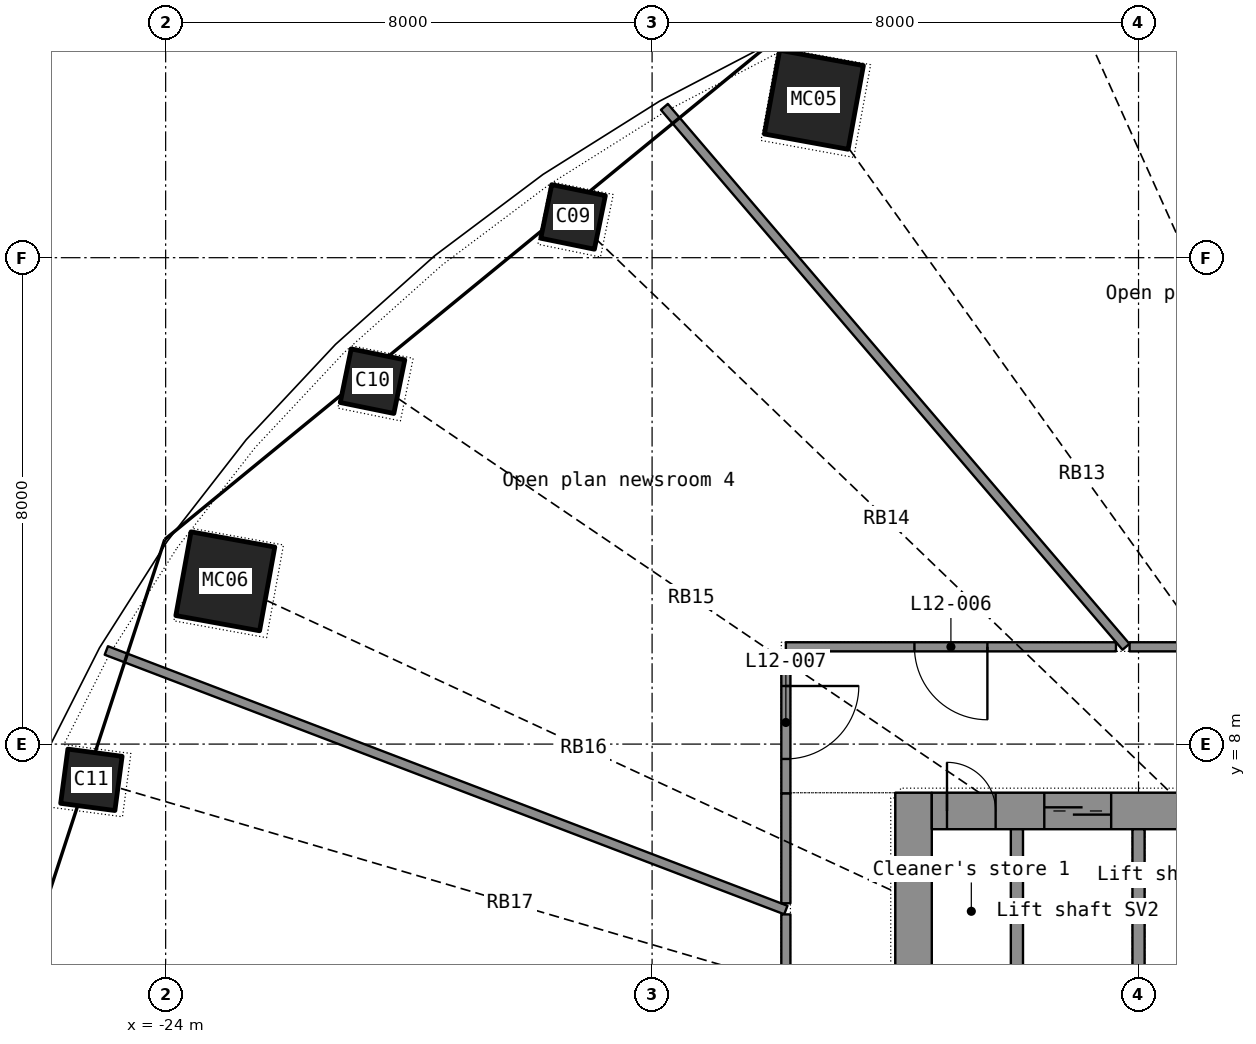
"""IFC4 building model, lengths in metres.
Left out: names, types, materials, properties, quantities, classifications, styles, units other than length and angle.
Written with IfcOpenShell. Run it as: python <this file> out.ifc"""

import sys

from ifc_helpers import new_model, si_unit, direction, frame, frame_2d, origin, origin_2d, place, context, subcontext, project, spatial, rectangle, hollow_rectangle, extrude, element, fill, save


model = new_model("IFC4")
c1 = context("Model", 3, precision=1e-05, world=origin(), true_north=direction((0.0, 1.0)))
c2 = subcontext(c1, "Body", "Model", "MODEL_VIEW")
j1 = project(units=[si_unit("LENGTHUNIT", "METRE"), si_unit("PLANEANGLEUNIT", "RADIAN")], contexts=[c1])
p1 = place(None, origin())
s1 = spatial("IfcSite", under=j1, at=p1, CompositionType="ELEMENT")
p2 = place(p1, origin())
s2 = spatial("IfcBuilding", under=s1, at=p2, CompositionType="ELEMENT")
p3 = place(p2, frame((0.0, 0.0, 55.6)))
s3 = spatial("IfcBuildingStorey", under=s2, at=p3, CompositionType="ELEMENT", Elevation=55.6)
p4 = place(p3, frame((-13.339, 18.597, 0.0), z_axis=(0.017280237, -0.024535299, 0.999549605), x_axis=(0.907605865, 0.419788733, -0.005386429)))
e1 = element("IfcColumn", 1, at=p4, inside=s3, PredefinedType="COLUMN", context=c2, shape_type="SweptSolid", body=[
    extrude(hollow_rectangle(XDim=1.4, YDim=1.4, WallThickness=0.04, at=origin_2d()), origin(), (0.0, 0.0, 1.0), 3.702),
])
p5 = place(p3, frame((-17.299, 16.67, 0.0), z_axis=(0.022226156, -0.021698532, 0.999517469), x_axis=(0.827705276, 0.561128539, -0.006224044)))
e2 = element("IfcColumn", 2, at=p5, inside=s3, PredefinedType="COLUMN", context=c2, shape_type="SweptSolid", body=[
    extrude(hollow_rectangle(XDim=0.9, YDim=0.9, WallThickness=0.025, at=origin_2d()), origin(), (0.0, 0.0, 1.0), 3.702),
])
p6 = place(p3, frame((-20.598, 13.969, 0.0), z_axis=(0.026512179, -0.018202391, 0.999482755), x_axis=(0.719487354, 0.694475707, -0.006437388)))
e3 = element("IfcColumn", 3, at=p6, inside=s3, PredefinedType="COLUMN", context=c2, shape_type="SweptSolid", body=[
    extrude(hollow_rectangle(XDim=0.9, YDim=0.9, WallThickness=0.025, at=origin_2d()), origin(), (0.0, 0.0, 1.0), 3.702),
])
p7 = place(p3, frame((-23.019, 10.677, 0.0), z_axis=(0.030006556, -0.014178922, 0.999449131), x_axis=(0.581821386, 0.81329497, -0.005930077)))
e4 = element("IfcColumn", 4, at=p7, inside=s3, PredefinedType="COLUMN", context=c2, shape_type="SweptSolid", body=[
    extrude(hollow_rectangle(XDim=1.4, YDim=1.4, WallThickness=0.04, at=origin_2d()), origin(), (0.0, 0.0, 1.0), 3.702),
])
p8 = place(p3, frame((-25.221, 7.412, 0.0), z_axis=(0.032511791, -0.009694185, 0.999424337), x_axis=(0.409583368, 0.912261715, -0.004475231)))
e5 = element("IfcColumn", 5, at=p8, inside=s3, PredefinedType="COLUMN", context=c2, shape_type="SweptSolid", body=[
    extrude(hollow_rectangle(XDim=0.9, YDim=0.9, WallThickness=0.025, at=origin_2d()), origin(), (0.0, 0.0, 1.0), 3.702),
])
p9 = place(p3, frame((-11.7, -7.2, 0.0), z_axis=(0.0, 0.0, 1.0), x_axis=(0.0, 1.0, 0.0)))
e6 = element("IfcWall", 6, at=p9, inside=s3, PredefinedType="SHEAR", context=c2, shape_type="SweptSolid", body=[
    extrude(rectangle(XDim=14.4, YDim=0.6, at=frame_2d((7.2, 0.0))), origin(), (0.0, 0.0, 1.0), 3.3),
])
p10 = place(p9, frame((6.5, 0.0, 0.0)))
e7 = element("IfcOpeningElement", 7, at=p10, cuts=e6, PredefinedType="OPENING", context=c2, shape_type="SweptSolid", body=[
    extrude(rectangle(XDim=1.4, YDim=2.2, at=frame_2d((0.7, 1.1))), frame((0.0, 0.31, 0.0), z_axis=(0.0, -1.0, 0.0), x_axis=(1.0, 0.0, 0.0)), (0.0, 0.0, 1.0), 0.62),
])
p11 = place(p3, frame((-11.4, 6.9, 0.0), z_axis=(0.0, 0.0, 1.0), x_axis=(1.0, 0.0, 0.0)))
e8 = element("IfcWall", 8, at=p11, inside=s3, PredefinedType="SHEAR", context=c2, shape_type="SweptSolid", body=[
    extrude(rectangle(XDim=22.8, YDim=0.6, at=frame_2d((11.4, 0.0))), origin(), (0.0, 0.0, 1.0), 3.3),
])
p12 = place(p11, frame((1.85, 0.0, 0.0)))
e9 = element("IfcOpeningElement", 9, at=p12, cuts=e8, PredefinedType="OPENING", context=c2, shape_type="SweptSolid", body=[
    extrude(rectangle(XDim=1.1, YDim=2.2, at=frame_2d((0.55, 1.1))), frame((0.0, 0.31, 0.0), z_axis=(0.0, -1.0, 0.0), x_axis=(1.0, 0.0, 0.0)), (0.0, 0.0, 1.0), 0.62),
])
p13 = place(p11, frame((6.95, 0.0, 0.0)))
e10 = element("IfcOpeningElement", 10, at=p13, cuts=e8, PredefinedType="OPENING", context=c2, shape_type="SweptSolid", body=[
    extrude(rectangle(XDim=0.9, YDim=2.1, at=frame_2d((0.45, 1.05))), frame((0.0, 0.31, 0.0), z_axis=(0.0, -1.0, 0.0), x_axis=(1.0, 0.0, 0.0)), (0.0, 0.0, 1.0), 0.62),
])
p14 = place(p11, frame((10.95, 0.0, 0.0)))
e11 = element("IfcOpeningElement", 11, at=p14, cuts=e8, PredefinedType="OPENING", context=c2, shape_type="SweptSolid", body=[
    extrude(rectangle(XDim=0.9, YDim=2.1, at=frame_2d((0.45, 1.05))), frame((0.0, 0.31, 0.0), z_axis=(0.0, -1.0, 0.0), x_axis=(1.0, 0.0, 0.0)), (0.0, 0.0, 1.0), 0.62),
])
p15 = place(p11, frame((14.95, 0.0, 0.0)))
e12 = element("IfcOpeningElement", 12, at=p15, cuts=e8, PredefinedType="OPENING", context=c2, shape_type="SweptSolid", body=[
    extrude(rectangle(XDim=0.9, YDim=2.1, at=frame_2d((0.45, 1.05))), frame((0.0, 0.31, 0.0), z_axis=(0.0, -1.0, 0.0), x_axis=(1.0, 0.0, 0.0)), (0.0, 0.0, 1.0), 0.62),
])
p16 = place(p11, frame((18.95, 0.0, 0.0)))
e13 = element("IfcOpeningElement", 13, at=p16, cuts=e8, PredefinedType="OPENING", context=c2, shape_type="SweptSolid", body=[
    extrude(rectangle(XDim=0.9, YDim=2.1, at=frame_2d((0.45, 1.05))), frame((0.0, 0.31, 0.0), z_axis=(0.0, -1.0, 0.0), x_axis=(1.0, 0.0, 0.0)), (0.0, 0.0, 1.0), 0.62),
])
p17 = place(p11, frame((0.25, 0.0, 0.0)))
e14 = element("IfcOpeningElement", 14, at=p17, cuts=e8, PredefinedType="OPENING", context=c2, shape_type="SweptSolid", body=[
    extrude(rectangle(XDim=0.8, YDim=2.05, at=frame_2d((0.4, 1.025))), frame((0.0, 0.31, 0.0), z_axis=(0.0, -1.0, 0.0), x_axis=(1.0, 0.0, 0.0)), (0.0, 0.0, 1.0), 0.62),
])
p18 = place(p11, frame((21.75, 0.0, 0.0)))
e15 = element("IfcOpeningElement", 15, at=p18, cuts=e8, PredefinedType="OPENING", context=c2, shape_type="SweptSolid", body=[
    extrude(rectangle(XDim=0.8, YDim=2.05, at=frame_2d((0.4, 1.025))), frame((0.0, 0.31, 0.0), z_axis=(0.0, -1.0, 0.0), x_axis=(1.0, 0.0, 0.0)), (0.0, 0.0, 1.0), 0.62),
])
for number, where, z_axis, x_axis in (
    (16, (-10.0, 3.9, 0.0), (0.0, 0.0, 1.0), (0.0, 1.0, 0.0)),
    (17, (-8.0, 3.9, 0.0), (0.0, 0.0, 1.0), (0.0, 1.0, 0.0)),
):
    element("IfcWall", number, at=place(p3, frame(where, z_axis=z_axis, x_axis=x_axis)), inside=s3, PredefinedType="SHEAR", context=c2, shape_type="SweptSolid", body=[
        extrude(rectangle(XDim=2.7, YDim=0.2, at=frame_2d((1.35, 0.0))), origin(), (0.0, 0.0, 1.0), 3.3),
    ])
p19 = place(p3, frame((-24.976, 9.54, 0.0), z_axis=(0.0, 0.0, 1.0), x_axis=(0.934168918, -0.356831098, 0.0)))
e18 = element("IfcWall", 18, at=p19, inside=s3, PredefinedType="PARTITIONING", context=c2, shape_type="SweptSolid", body=[
    extrude(rectangle(XDim=11.963, YDim=0.15, at=frame_2d((5.981, 0.0))), origin(), (0.0, 0.0, 1.0), 2.4),
])
p20 = place(p3, frame((-15.798, 18.48, 0.0), z_axis=(0.0, 0.0, 1.0), x_axis=(0.649782318, -0.760120345, 0.0)))
e19 = element("IfcWall", 19, at=p20, inside=s3, PredefinedType="PARTITIONING", context=c2, shape_type="SweptSolid", body=[
    extrude(rectangle(XDim=11.683, YDim=0.15, at=frame_2d((5.841, 0.0))), origin(), (0.0, 0.0, 1.0), 2.4),
])
p21 = place(p3, frame((-1.111, 9.6, 0.0), z_axis=(0.0, 0.0, 1.0), x_axis=(-1.0, 0.0, 0.0)))
e20 = element("IfcWall", 20, at=p21, inside=s3, PredefinedType="PARTITIONING", context=c2, shape_type="SweptSolid", body=[
    extrude(rectangle(XDim=7.037, YDim=0.15, at=frame_2d((3.518, 0.0))), origin(), (0.0, 0.0, 1.0), 2.4),
])
p22 = place(p21, frame((2.918, 0.0, 0.0)))
e21 = element("IfcOpeningElement", 21, at=p22, cuts=e20, PredefinedType="OPENING", context=c2, shape_type="SweptSolid", body=[
    extrude(rectangle(XDim=1.2, YDim=2.2, at=frame_2d((0.6, 1.1))), frame((0.0, 0.085, 0.0), z_axis=(0.0, -1.0, 0.0), x_axis=(1.0, 0.0, 0.0)), (0.0, 0.0, 1.0), 0.17),
])
p23 = place(p3, frame((-13.8, 5.199, 0.0), z_axis=(0.0, 0.0, 1.0), x_axis=(0.0, -1.0, 0.0)))
e22 = element("IfcWall", 22, at=p23, inside=s3, PredefinedType="PARTITIONING", context=c2, shape_type="SweptSolid", body=[
    extrude(rectangle(XDim=6.111, YDim=0.15, at=frame_2d((3.056, 0.0))), origin(), (0.0, 0.0, 1.0), 2.4),
])
p24 = place(p23, frame((2.456, 0.0, 0.0)))
e23 = element("IfcOpeningElement", 23, at=p24, cuts=e22, PredefinedType="OPENING", context=c2, shape_type="SweptSolid", body=[
    extrude(rectangle(XDim=1.2, YDim=2.2, at=frame_2d((0.6, 1.1))), frame((0.0, 0.085, 0.0), z_axis=(0.0, -1.0, 0.0), x_axis=(1.0, 0.0, 0.0)), (0.0, 0.0, 1.0), 0.17),
])
p25 = place(p3, frame((-8.371, 9.6, 0.0), z_axis=(0.0, 0.0, 1.0), x_axis=(-1.0, 0.0, 0.0)))
e24 = element("IfcWall", 24, at=p25, inside=s3, PredefinedType="PARTITIONING", context=c2, shape_type="SweptSolid", body=[
    extrude(rectangle(XDim=5.429, YDim=0.15, at=frame_2d((2.714, 0.0))), origin(), (0.0, 0.0, 1.0), 2.4),
])
p26 = place(p25, frame((2.115, 0.0, 0.0)))
e25 = element("IfcOpeningElement", 25, at=p26, cuts=e24, PredefinedType="OPENING", context=c2, shape_type="SweptSolid", body=[
    extrude(rectangle(XDim=1.2, YDim=2.2, at=frame_2d((0.6, 1.1))), frame((0.0, 0.085, 0.0), z_axis=(0.0, -1.0, 0.0), x_axis=(1.0, 0.0, 0.0)), (0.0, 0.0, 1.0), 0.17),
])
p27 = place(p3, frame((-13.8, 9.523, 0.0), z_axis=(0.0, 0.0, 1.0), x_axis=(0.0, -1.0, 0.0)))
e26 = element("IfcWall", 26, at=p27, inside=s3, PredefinedType="PARTITIONING", context=c2, shape_type="SweptSolid", body=[
    extrude(rectangle(XDim=2.335, YDim=0.15, at=frame_2d((1.167, 0.0))), origin(), (0.0, 0.0, 1.0), 2.4),
])
p28 = place(p27, frame((0.567, 0.0, 0.0)))
e27 = element("IfcOpeningElement", 27, at=p28, cuts=e26, PredefinedType="OPENING", context=c2, shape_type="SweptSolid", body=[
    extrude(rectangle(XDim=1.2, YDim=2.2, at=frame_2d((0.6, 1.1))), frame((0.0, 0.085, 0.0), z_axis=(0.0, -1.0, 0.0), x_axis=(1.0, 0.0, 0.0)), (0.0, 0.0, 1.0), 0.17),
])
p29 = place(p3, frame((-13.8, 7.187, 0.0), z_axis=(0.0, 0.0, 1.0), x_axis=(0.0, -1.0, 0.0)))
e28 = element("IfcWall", 28, at=p29, inside=s3, PredefinedType="PARTITIONING", context=c2, shape_type="SweptSolid", body=[
    extrude(rectangle(XDim=1.805, YDim=0.15, at=frame_2d((0.902, 0.0))), origin(), (0.0, 0.0, 1.0), 2.4),
])
p30 = place(p12, origin())
e29 = element("IfcDoor", 29, at=p30, inside=s3, OperationType="DOUBLE_DOOR_SLIDING", PredefinedType="DOOR", context=c2, shape_type="SweptSolid", body=[
    extrude(rectangle(XDim=1.1, YDim=2.2, at=frame_2d((0.55, 1.1))), frame((0.0, 0.025, 0.0), z_axis=(0.0, -1.0, 0.0), x_axis=(1.0, 0.0, 0.0)), (0.0, 0.0, 1.0), 0.05),
])
fill(e9, e29)
p31 = place(p17, origin())
e30 = element("IfcDoor", 30, at=p31, inside=s3, OperationType="SINGLE_SWING_LEFT", PredefinedType="DOOR", context=c2, shape_type="SweptSolid", body=[
    extrude(rectangle(XDim=0.8, YDim=2.05, at=frame_2d((0.4, 1.025))), frame((0.0, 0.025, 0.0), z_axis=(0.0, -1.0, 0.0), x_axis=(1.0, 0.0, 0.0)), (0.0, 0.0, 1.0), 0.05),
])
fill(e14, e30)
p32 = place(p26, origin())
e31 = element("IfcDoor", 31, at=p32, inside=s3, OperationType="DOUBLE_DOOR_SINGLE_SWING", PredefinedType="DOOR", context=c2, shape_type="SweptSolid", body=[
    extrude(rectangle(XDim=1.2, YDim=2.2, at=frame_2d((0.6, 1.1))), frame((0.0, 0.025, 0.0), z_axis=(0.0, -1.0, 0.0), x_axis=(1.0, 0.0, 0.0)), (0.0, 0.0, 1.0), 0.05),
])
fill(e25, e31)
p33 = place(p28, origin())
e32 = element("IfcDoor", 32, at=p33, inside=s3, OperationType="DOUBLE_DOOR_SINGLE_SWING", PredefinedType="DOOR", context=c2, shape_type="SweptSolid", body=[
    extrude(rectangle(XDim=1.2, YDim=2.2, at=frame_2d((0.6, 1.1))), frame((0.0, 0.025, 0.0), z_axis=(0.0, -1.0, 0.0), x_axis=(1.0, 0.0, 0.0)), (0.0, 0.0, 1.0), 0.05),
])
fill(e27, e32)
save(model, sys.argv[1])
